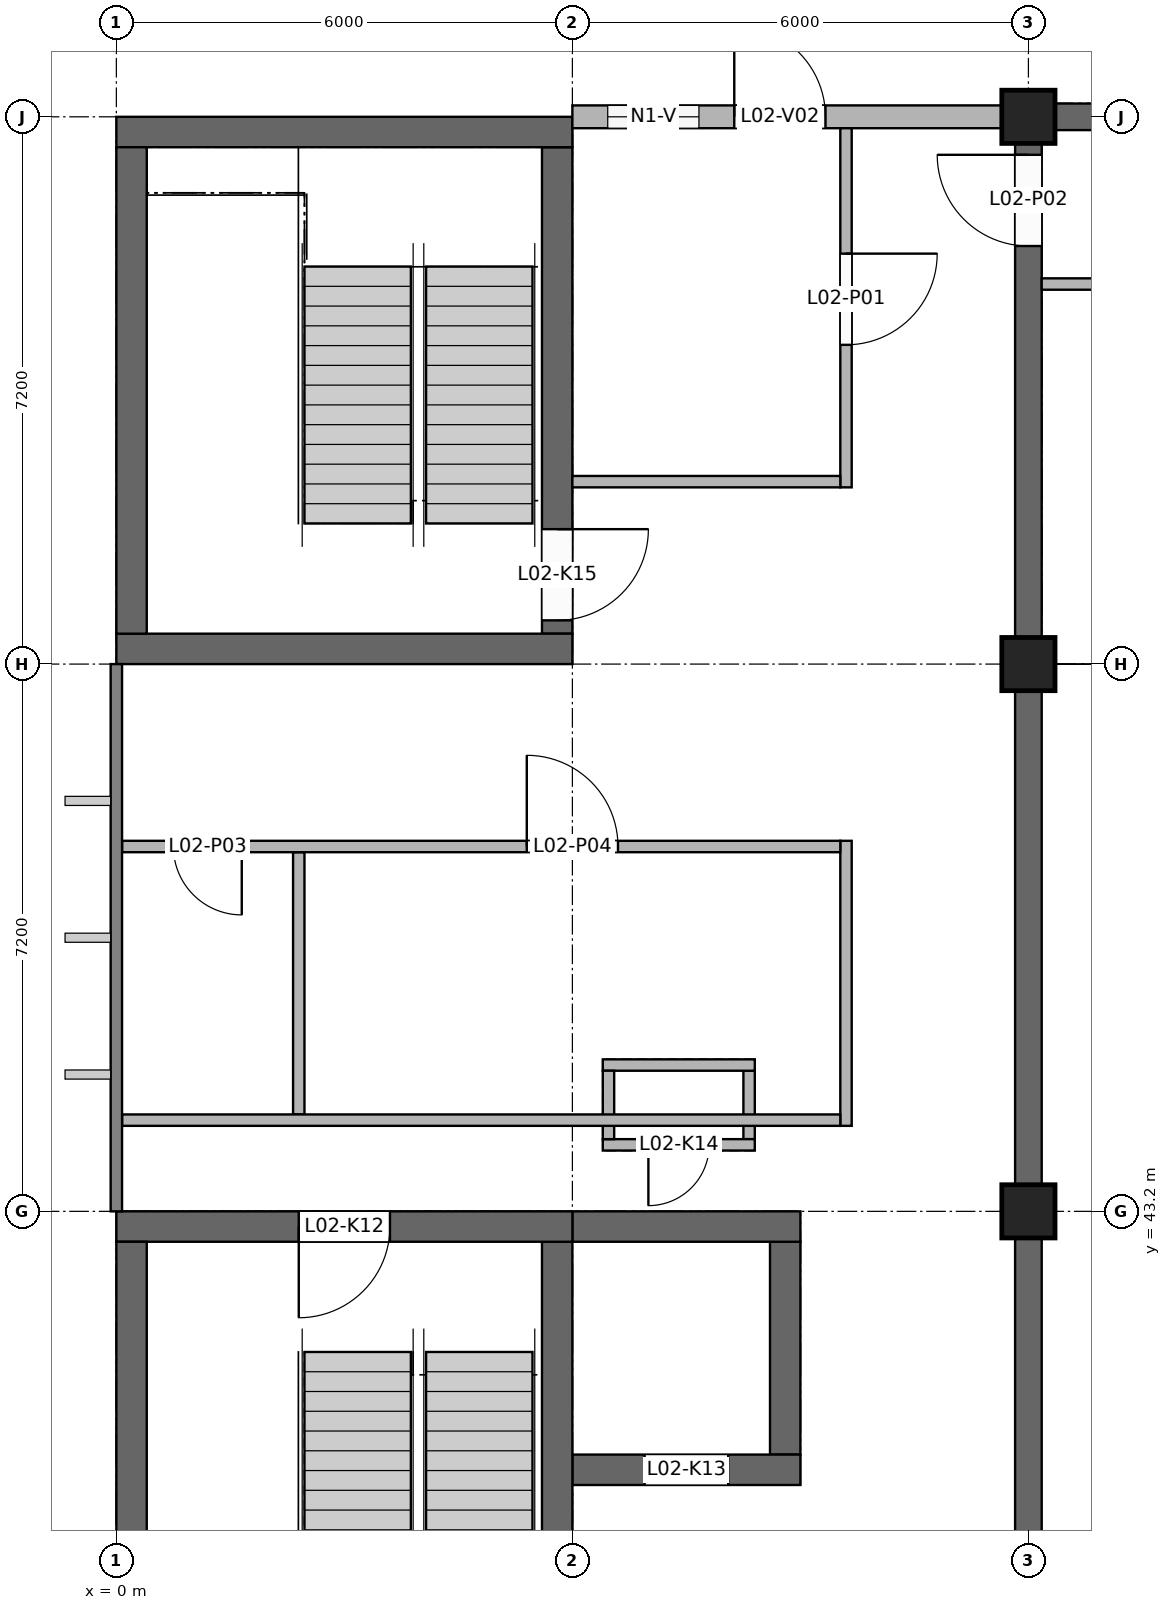
"""IFC4 building model, lengths in metres.
Left out: names, types, materials, properties, quantities, classifications, styles, units other than length and angle.
Written with IfcOpenShell. Run it as: python <this file> out.ifc"""

import sys

from ifc_helpers import new_model, si_unit, direction, frame, frame_2d, origin, origin_2d, place, context, subcontext, project, spatial, rectangle, extrude, element, fill, save


model = new_model("IFC4")
c1 = context("Model", 3, precision=1e-05, world=origin(), true_north=direction((0.0, 1.0)))
c2 = subcontext(c1, "Body", "Model", "MODEL_VIEW")
j1 = project(units=[si_unit("LENGTHUNIT", "METRE"), si_unit("PLANEANGLEUNIT", "RADIAN")], contexts=[c1])
p1 = place(None, origin())
s1 = spatial("IfcSite", under=j1, at=p1, CompositionType="ELEMENT")
p2 = place(p1, origin())
s2 = spatial("IfcBuilding", under=s1, at=p2, CompositionType="ELEMENT")
p3 = place(p2, frame((0.0, 0.0, 8.4)))
s3 = spatial("IfcBuildingStorey", under=s2, at=p3, CompositionType="ELEMENT", Elevation=8.4)
p4 = place(p3, frame((0.0, 43.0, 0.0), z_axis=(0.0, 0.0, 1.0), x_axis=(1.0, 0.0, 0.0)))
e1 = element("IfcWall", 1, at=p4, inside=s3, PredefinedType="SHEAR", context=c2, shape_type="SweptSolid", body=[
    extrude(rectangle(XDim=6.0, YDim=0.4, at=frame_2d((3.0, 0.0))), origin(), (0.0, 0.0, 1.0), 4.0),
])
p5 = place(p4, frame((2.4, 0.0, 0.0)))
e2 = element("IfcOpeningElement", 2, at=p5, cuts=e1, PredefinedType="OPENING", context=c2, shape_type="SweptSolid", body=[
    extrude(rectangle(XDim=1.2, YDim=2.1, at=frame_2d((0.6, 1.05))), frame((0.0, 0.21, 0.0), z_axis=(0.0, -1.0, 0.0), x_axis=(1.0, 0.0, 0.0)), (0.0, 0.0, 1.0), 0.42),
])
for number, where, z_axis, x_axis in (
    (3, (0.2, 36.4, 0.0), (0.0, 0.0, 1.0), (0.0, 1.0, 0.0)),
    (4, (5.8, 36.4, 0.0), (0.0, 0.0, 1.0), (0.0, 1.0, 0.0)),
):
    element("IfcWall", number, at=place(p3, frame(where, z_axis=z_axis, x_axis=x_axis)), inside=s3, PredefinedType="SHEAR", context=c2, shape_type="SweptSolid", body=[
        extrude(rectangle(XDim=6.4, YDim=0.4, at=frame_2d((3.2, 0.0))), origin(), (0.0, 0.0, 1.0), 4.0),
    ])
p6 = place(p3, frame((6.0, 39.8, 0.0), z_axis=(0.0, 0.0, 1.0), x_axis=(1.0, 0.0, 0.0)))
e5 = element("IfcWall", 5, at=p6, inside=s3, PredefinedType="SHEAR", context=c2, shape_type="SweptSolid", body=[
    extrude(rectangle(XDim=3.0, YDim=0.4, at=frame_2d((1.5, 0.0))), origin(), (0.0, 0.0, 1.0), 4.2),
])
p7 = place(p6, frame((0.95, 0.0, 0.0)))
e6 = element("IfcOpeningElement", 6, at=p7, cuts=e5, PredefinedType="OPENING", context=c2, shape_type="SweptSolid", body=[
    extrude(rectangle(XDim=1.1, YDim=2.1, at=frame_2d((0.55, 1.05))), frame((0.0, 0.21, 0.0), z_axis=(0.0, -1.0, 0.0), x_axis=(1.0, 0.0, 0.0)), (0.0, 0.0, 1.0), 0.42),
])
p8 = place(p3, frame((6.0, 43.0, 0.0), z_axis=(0.0, 0.0, 1.0), x_axis=(1.0, 0.0, 0.0)))
e7 = element("IfcWall", 7, at=p8, inside=s3, PredefinedType="SHEAR", context=c2, shape_type="SweptSolid", body=[
    extrude(rectangle(XDim=3.0, YDim=0.4, at=frame_2d((1.5, 0.0))), origin(), (0.0, 0.0, 1.0), 4.2),
])
p9 = place(p3, frame((8.8, 40.0, 0.0), z_axis=(0.0, 0.0, 1.0), x_axis=(0.0, 1.0, 0.0)))
e8 = element("IfcWall", 8, at=p9, inside=s3, PredefinedType="SHEAR", context=c2, shape_type="SweptSolid", body=[
    extrude(rectangle(XDim=2.8, YDim=0.4, at=frame_2d((1.4, 0.0))), origin(), (0.0, 0.0, 1.0), 4.2),
])
for number, where, z_axis, x_axis in (
    (9, (0.0, 50.6, 0.0), (0.0, 0.0, 1.0), (1.0, 0.0, 0.0)),
    (10, (0.0, 57.4, 0.0), (0.0, 0.0, 1.0), (1.0, 0.0, 0.0)),
):
    element("IfcWall", number, at=place(p3, frame(where, z_axis=z_axis, x_axis=x_axis)), inside=s3, PredefinedType="SHEAR", context=c2, shape_type="SweptSolid", body=[
        extrude(rectangle(XDim=6.0, YDim=0.4, at=frame_2d((3.0, 0.0))), origin(), (0.0, 0.0, 1.0), 4.0),
    ])
p10 = place(p3, frame((0.2, 50.8, 0.0), z_axis=(0.0, 0.0, 1.0), x_axis=(0.0, 1.0, 0.0)))
e11 = element("IfcWall", 11, at=p10, inside=s3, PredefinedType="SHEAR", context=c2, shape_type="SweptSolid", body=[
    extrude(rectangle(XDim=6.4, YDim=0.4, at=frame_2d((3.2, 0.0))), origin(), (0.0, 0.0, 1.0), 4.0),
])
p11 = place(p3, frame((5.8, 50.8, 0.0), z_axis=(0.0, 0.0, 1.0), x_axis=(0.0, 1.0, 0.0)))
e12 = element("IfcWall", 12, at=p11, inside=s3, PredefinedType="SHEAR", context=c2, shape_type="SweptSolid", body=[
    extrude(rectangle(XDim=6.4, YDim=0.4, at=frame_2d((3.2, 0.0))), origin(), (0.0, 0.0, 1.0), 4.0),
])
p12 = place(p11, frame((0.175, 0.0, 0.0)))
e13 = element("IfcOpeningElement", 13, at=p12, cuts=e12, PredefinedType="OPENING", context=c2, shape_type="SweptSolid", body=[
    extrude(rectangle(XDim=1.2, YDim=2.1, at=frame_2d((0.6, 1.05))), frame((0.0, 0.21, 0.0), z_axis=(0.0, -1.0, 0.0), x_axis=(1.0, 0.0, 0.0)), (0.0, 0.0, 1.0), 0.42),
])
p13 = place(p3, frame((6.4, 44.075, 0.0), z_axis=(0.0, 0.0, 1.0), x_axis=(1.0, 0.0, 0.0)))
e14 = element("IfcWall", 14, at=p13, inside=s3, PredefinedType="SOLIDWALL", context=c2, shape_type="SweptSolid", body=[
    extrude(rectangle(XDim=2.0, YDim=0.15, at=frame_2d((1.0, 0.0))), origin(), (0.0, 0.0, 1.0), 4.2),
])
p14 = place(p13, frame((0.6, 0.0, 0.0)))
e15 = element("IfcOpeningElement", 15, at=p14, cuts=e14, PredefinedType="OPENING", context=c2, shape_type="SweptSolid", body=[
    extrude(rectangle(XDim=0.8, YDim=2.1, at=frame_2d((0.4, 1.05))), frame((0.0, 0.085, 0.0), z_axis=(0.0, -1.0, 0.0), x_axis=(1.0, 0.0, 0.0)), (0.0, 0.0, 1.0), 0.17),
])
p15 = place(p3, frame((6.4, 45.125, 0.0), z_axis=(0.0, 0.0, 1.0), x_axis=(1.0, 0.0, 0.0)))
e16 = element("IfcWall", 16, at=p15, inside=s3, PredefinedType="SOLIDWALL", context=c2, shape_type="SweptSolid", body=[
    extrude(rectangle(XDim=2.0, YDim=0.15, at=frame_2d((1.0, 0.0))), origin(), (0.0, 0.0, 1.0), 4.2),
])
for number, where, z_axis, x_axis in (
    (17, (6.475, 44.15, 0.0), (0.0, 0.0, 1.0), (0.0, 1.0, 0.0)),
    (18, (8.325, 44.15, 0.0), (0.0, 0.0, 1.0), (0.0, 1.0, 0.0)),
):
    element("IfcWall", number, at=place(p3, frame(where, z_axis=z_axis, x_axis=x_axis)), inside=s3, PredefinedType="SOLIDWALL", context=c2, shape_type="SweptSolid", body=[
        extrude(rectangle(XDim=0.9, YDim=0.15, at=frame_2d((0.45, 0.0))), origin(), (0.0, 0.0, 1.0), 4.2),
    ])
for number, where, z_axis, x_axis in (
    (19, (12.0, 43.2, 0.0), (0.0, 0.0, 1.0), (1.0, 0.0, 0.0)),
    (20, (12.0, 50.4, 0.0), (0.0, 0.0, 1.0), (1.0, 0.0, 0.0)),
    (21, (12.0, 57.6, 0.0), (0.0, 0.0, 1.0), (1.0, 0.0, 0.0)),
):
    element("IfcColumn", number, at=place(p3, frame(where, z_axis=z_axis, x_axis=x_axis)), inside=s3, PredefinedType="COLUMN", context=c2, shape_type="SweptSolid", body=[
        extrude(rectangle(XDim=0.7, YDim=0.7, at=origin_2d()), origin(), (0.0, 0.0, 1.0), 4.0),
    ])
for number, where, z_axis, x_axis in (
    (22, (12.0, 36.35, 0.0), (0.0, 0.0, 1.0), (0.0, 1.0, 0.0)),
    (23, (12.0, 43.55, 0.0), (0.0, 0.0, 1.0), (0.0, 1.0, 0.0)),
):
    element("IfcWall", number, at=place(p3, frame(where, z_axis=z_axis, x_axis=x_axis)), inside=s3, PredefinedType="SHEAR", context=c2, shape_type="SweptSolid", body=[
        extrude(rectangle(XDim=6.5, YDim=0.35, at=frame_2d((3.25, 0.0))), origin(), (0.0, 0.0, 1.0), 3.1),
    ])
p16 = place(p3, frame((12.0, 50.75, 0.0), z_axis=(0.0, 0.0, 1.0), x_axis=(0.0, 1.0, 0.0)))
e24 = element("IfcWall", 24, at=p16, inside=s3, PredefinedType="SHEAR", context=c2, shape_type="SweptSolid", body=[
    extrude(rectangle(XDim=6.5, YDim=0.35, at=frame_2d((3.25, 0.0))), origin(), (0.0, 0.0, 1.0), 3.1),
])
p17 = place(p16, frame((5.15, 0.0, 0.0)))
e25 = element("IfcOpeningElement", 25, at=p17, cuts=e24, PredefinedType="OPENING", context=c2, shape_type="SweptSolid", body=[
    extrude(rectangle(XDim=1.2, YDim=2.1, at=frame_2d((0.6, 1.05))), frame((0.0, 0.185, 0.0), z_axis=(0.0, -1.0, 0.0), x_axis=(1.0, 0.0, 0.0)), (0.0, 0.0, 1.0), 0.37),
])
p18 = place(p3, frame((12.35, 57.6, 0.0), z_axis=(0.0, 0.0, 1.0), x_axis=(1.0, 0.0, 0.0)))
e26 = element("IfcWall", 26, at=p18, inside=s3, PredefinedType="SHEAR", context=c2, shape_type="SweptSolid", body=[
    extrude(rectangle(XDim=17.475, YDim=0.35, at=frame_2d((8.737, 0.0))), origin(), (0.0, 0.0, 1.0), 4.2),
])
p19 = place(p18, frame((0.85, 0.0, 1.2)))
e27 = element("IfcOpeningElement", 27, at=p19, cuts=e26, PredefinedType="OPENING", context=c2, shape_type="SweptSolid", body=[
    extrude(rectangle(XDim=0.6, YDim=2.4, at=frame_2d((0.3, 1.2))), frame((0.0, 0.185, 0.0), z_axis=(0.0, -1.0, 0.0), x_axis=(1.0, 0.0, 0.0)), (0.0, 0.0, 1.0), 0.37),
])
p20 = place(p18, frame((3.85, 0.0, 1.2)))
e28 = element("IfcOpeningElement", 28, at=p20, cuts=e26, PredefinedType="OPENING", context=c2, shape_type="SweptSolid", body=[
    extrude(rectangle(XDim=0.6, YDim=2.4, at=frame_2d((0.3, 1.2))), frame((0.0, 0.185, 0.0), z_axis=(0.0, -1.0, 0.0), x_axis=(1.0, 0.0, 0.0)), (0.0, 0.0, 1.0), 0.37),
])
p21 = place(p18, frame((6.85, 0.0, 1.2)))
e29 = element("IfcOpeningElement", 29, at=p21, cuts=e26, PredefinedType="OPENING", context=c2, shape_type="SweptSolid", body=[
    extrude(rectangle(XDim=0.6, YDim=2.4, at=frame_2d((0.3, 1.2))), frame((0.0, 0.185, 0.0), z_axis=(0.0, -1.0, 0.0), x_axis=(1.0, 0.0, 0.0)), (0.0, 0.0, 1.0), 0.37),
])
p22 = place(p18, frame((9.85, 0.0, 1.2)))
e30 = element("IfcOpeningElement", 30, at=p22, cuts=e26, PredefinedType="OPENING", context=c2, shape_type="SweptSolid", body=[
    extrude(rectangle(XDim=0.6, YDim=2.4, at=frame_2d((0.3, 1.2))), frame((0.0, 0.185, 0.0), z_axis=(0.0, -1.0, 0.0), x_axis=(1.0, 0.0, 0.0)), (0.0, 0.0, 1.0), 0.37),
])
p23 = place(p18, frame((12.85, 0.0, 1.2)))
e31 = element("IfcOpeningElement", 31, at=p23, cuts=e26, PredefinedType="OPENING", context=c2, shape_type="SweptSolid", body=[
    extrude(rectangle(XDim=0.6, YDim=2.4, at=frame_2d((0.3, 1.2))), frame((0.0, 0.185, 0.0), z_axis=(0.0, -1.0, 0.0), x_axis=(1.0, 0.0, 0.0)), (0.0, 0.0, 1.0), 0.37),
])
p24 = place(p18, frame((15.85, 0.0, 1.2)))
e32 = element("IfcOpeningElement", 32, at=p24, cuts=e26, PredefinedType="OPENING", context=c2, shape_type="SweptSolid", body=[
    extrude(rectangle(XDim=0.6, YDim=2.4, at=frame_2d((0.3, 1.2))), frame((0.0, 0.185, 0.0), z_axis=(0.0, -1.0, 0.0), x_axis=(1.0, 0.0, 0.0)), (0.0, 0.0, 1.0), 0.37),
])
p25 = place(p3, frame((6.0, 57.6, 0.0), z_axis=(0.0, 0.0, 1.0), x_axis=(1.0, 0.0, 0.0)))
e33 = element("IfcWall", 33, at=p25, inside=s3, PredefinedType="SOLIDWALL", context=c2, shape_type="SweptSolid", body=[
    extrude(rectangle(XDim=5.65, YDim=0.3, at=frame_2d((2.825, 0.0))), origin(), (0.0, 0.0, 1.0), 3.2),
])
p26 = place(p25, frame((2.13, 0.0, 0.0)))
e34 = element("IfcOpeningElement", 34, at=p26, cuts=e33, PredefinedType="OPENING", context=c2, shape_type="SweptSolid", body=[
    extrude(rectangle(XDim=1.2, YDim=2.4, at=frame_2d((0.6, 1.2))), frame((0.0, 0.16, 0.0), z_axis=(0.0, -1.0, 0.0), x_axis=(1.0, 0.0, 0.0)), (0.0, 0.0, 1.0), 0.32),
])
p27 = place(p25, frame((0.465, 0.0, 0.9)))
e35 = element("IfcOpeningElement", 35, at=p27, cuts=e33, PredefinedType="OPENING", context=c2, shape_type="SweptSolid", body=[
    extrude(rectangle(XDim=1.2, YDim=1.5, at=frame_2d((0.6, 0.75))), frame((0.0, 0.16, 0.0), z_axis=(0.0, -1.0, 0.0), x_axis=(1.0, 0.0, 0.0)), (0.0, 0.0, 1.0), 0.32),
])
p28 = place(p3, frame((2.4, 44.475, 0.0), z_axis=(0.0, 0.0, 1.0), x_axis=(0.0, 1.0, 0.0)))
e36 = element("IfcWall", 36, at=p28, inside=s3, PredefinedType="PARTITIONING", context=c2, shape_type="SweptSolid", body=[
    extrude(rectangle(XDim=3.45, YDim=0.15, at=frame_2d((1.725, 0.0))), origin(), (0.0, 0.0, 1.0), 4.0),
])
p29 = place(p3, frame((9.6, 44.325, 0.0), z_axis=(0.0, 0.0, 1.0), x_axis=(0.0, 1.0, 0.0)))
e37 = element("IfcWall", 37, at=p29, inside=s3, PredefinedType="PARTITIONING", context=c2, shape_type="SweptSolid", body=[
    extrude(rectangle(XDim=3.75, YDim=0.15, at=frame_2d((1.875, 0.0))), origin(), (0.0, 0.0, 1.0), 4.0),
])
p30 = place(p3, frame((9.6, 52.725, 0.0), z_axis=(0.0, 0.0, 1.0), x_axis=(0.0, 1.0, 0.0)))
e38 = element("IfcWall", 38, at=p30, inside=s3, PredefinedType="PARTITIONING", context=c2, shape_type="SweptSolid", body=[
    extrude(rectangle(XDim=4.725, YDim=0.15, at=frame_2d((2.362, 0.0))), origin(), (0.0, 0.0, 1.0), 3.2),
])
p31 = place(p30, frame((1.875, 0.0, 0.0)))
e39 = element("IfcOpeningElement", 39, at=p31, cuts=e38, PredefinedType="OPENING", context=c2, shape_type="SweptSolid", body=[
    extrude(rectangle(XDim=1.2, YDim=2.1, at=frame_2d((0.6, 1.05))), frame((0.0, 0.085, 0.0), z_axis=(0.0, -1.0, 0.0), x_axis=(1.0, 0.0, 0.0)), (0.0, 0.0, 1.0), 0.17),
])
p32 = place(p3, frame((0.075, 44.4, 0.0), z_axis=(0.0, 0.0, 1.0), x_axis=(1.0, 0.0, 0.0)))
e40 = element("IfcWall", 40, at=p32, inside=s3, PredefinedType="PARTITIONING", context=c2, shape_type="SweptSolid", body=[
    extrude(rectangle(XDim=9.45, YDim=0.15, at=frame_2d((4.725, 0.0))), origin(), (0.0, 0.0, 1.0), 4.0),
])
p33 = place(p3, frame((0.075, 48.0, 0.0), z_axis=(0.0, 0.0, 1.0), x_axis=(1.0, 0.0, 0.0)))
e41 = element("IfcWall", 41, at=p33, inside=s3, PredefinedType="PARTITIONING", context=c2, shape_type="SweptSolid", body=[
    extrude(rectangle(XDim=9.45, YDim=0.15, at=frame_2d((4.725, 0.0))), origin(), (0.0, 0.0, 1.0), 4.0),
])
p34 = place(p33, frame((0.675, 0.0, 0.0)))
e42 = element("IfcOpeningElement", 42, at=p34, cuts=e41, PredefinedType="OPENING", context=c2, shape_type="SweptSolid", body=[
    extrude(rectangle(XDim=0.9, YDim=2.1, at=frame_2d((0.45, 1.05))), frame((0.0, 0.085, 0.0), z_axis=(0.0, -1.0, 0.0), x_axis=(1.0, 0.0, 0.0)), (0.0, 0.0, 1.0), 0.17),
])
p35 = place(p33, frame((5.325, 0.0, 0.0)))
e43 = element("IfcOpeningElement", 43, at=p35, cuts=e41, PredefinedType="OPENING", context=c2, shape_type="SweptSolid", body=[
    extrude(rectangle(XDim=1.2, YDim=2.1, at=frame_2d((0.6, 1.05))), frame((0.0, 0.085, 0.0), z_axis=(0.0, -1.0, 0.0), x_axis=(1.0, 0.0, 0.0)), (0.0, 0.0, 1.0), 0.17),
])
p36 = place(p3, frame((6.0, 52.8, 0.0), z_axis=(0.0, 0.0, 1.0), x_axis=(1.0, 0.0, 0.0)))
e44 = element("IfcWall", 44, at=p36, inside=s3, PredefinedType="PARTITIONING", context=c2, shape_type="SweptSolid", body=[
    extrude(rectangle(XDim=3.525, YDim=0.15, at=frame_2d((1.762, 0.0))), origin(), (0.0, 0.0, 1.0), 4.0),
])
p37 = place(p3, frame((12.175, 55.4, 0.0), z_axis=(0.0, 0.0, 1.0), x_axis=(1.0, 0.0, 0.0)))
e45 = element("IfcWall", 45, at=p37, inside=s3, PredefinedType="PARTITIONING", context=c2, shape_type="SweptSolid", body=[
    extrude(rectangle(XDim=17.65, YDim=0.15, at=frame_2d((8.825, 0.0))), origin(), (0.0, 0.0, 1.0), 3.1),
])
p38 = place(p37, frame((4.325, 0.0, 0.0)))
e46 = element("IfcOpeningElement", 46, at=p38, cuts=e45, PredefinedType="OPENING", context=c2, shape_type="SweptSolid", body=[
    extrude(rectangle(XDim=1.8, YDim=2.1, at=frame_2d((0.9, 1.05))), frame((0.0, 0.085, 0.0), z_axis=(0.0, -1.0, 0.0), x_axis=(1.0, 0.0, 0.0)), (0.0, 0.0, 1.0), 0.17),
])
p39 = place(p37, frame((11.975, 0.0, 0.0)))
e47 = element("IfcOpeningElement", 47, at=p39, cuts=e45, PredefinedType="OPENING", context=c2, shape_type="SweptSolid", body=[
    extrude(rectangle(XDim=0.9, YDim=2.1, at=frame_2d((0.45, 1.05))), frame((0.0, 0.085, 0.0), z_axis=(0.0, -1.0, 0.0), x_axis=(1.0, 0.0, 0.0)), (0.0, 0.0, 1.0), 0.17),
])
p40 = place(p37, frame((15.575, 0.0, 0.0)))
e48 = element("IfcOpeningElement", 48, at=p40, cuts=e45, PredefinedType="OPENING", context=c2, shape_type="SweptSolid", body=[
    extrude(rectangle(XDim=0.9, YDim=2.1, at=frame_2d((0.45, 1.05))), frame((0.0, 0.085, 0.0), z_axis=(0.0, -1.0, 0.0), x_axis=(1.0, 0.0, 0.0)), (0.0, 0.0, 1.0), 0.17),
])
p41 = place(p26, origin())
e49 = element("IfcDoor", 49, at=p41, inside=s3, OperationType="SINGLE_SWING_LEFT", PredefinedType="DOOR", context=c2, shape_type="SweptSolid", body=[
    extrude(rectangle(XDim=1.2, YDim=2.4, at=frame_2d((0.6, 1.2))), frame((0.0, 0.025, 0.0), z_axis=(0.0, -1.0, 0.0), x_axis=(1.0, 0.0, 0.0)), (0.0, 0.0, 1.0), 0.05),
])
fill(e34, e49)
p42 = place(p27, origin())
e50 = element("IfcWindow", 50, at=p42, inside=s3, PartitioningType="SINGLE_PANEL", PredefinedType="WINDOW", context=c2, shape_type="SweptSolid", body=[
    extrude(rectangle(XDim=1.2, YDim=1.5, at=frame_2d((0.6, 0.75))), frame((0.0, 0.03, 0.0), z_axis=(0.0, -1.0, 0.0), x_axis=(1.0, 0.0, 0.0)), (0.0, 0.0, 1.0), 0.06),
])
fill(e35, e50)
p43 = place(p5, frame((1.2, 0.0, 0.0), z_axis=(0.0, 0.0, 1.0), x_axis=(-1.0, 0.0, 0.0)))
e51 = element("IfcDoor", 51, at=p43, inside=s3, OperationType="SINGLE_SWING_RIGHT", PredefinedType="DOOR", context=c2, shape_type="SweptSolid", body=[
    extrude(rectangle(XDim=1.2, YDim=2.1, at=frame_2d((0.6, 1.05))), frame((0.0, 0.025, 0.0), z_axis=(0.0, -1.0, 0.0), x_axis=(1.0, 0.0, 0.0)), (0.0, 0.0, 1.0), 0.05),
])
fill(e2, e51)
p44 = place(p7, origin())
e52 = element("IfcDoor", 52, at=p44, inside=s3, OperationType="DOUBLE_DOOR_SLIDING", PredefinedType="DOOR", context=c2, shape_type="SweptSolid", body=[
    extrude(rectangle(XDim=1.1, YDim=2.1, at=frame_2d((0.55, 1.05))), frame((0.0, 0.025, 0.0), z_axis=(0.0, -1.0, 0.0), x_axis=(1.0, 0.0, 0.0)), (0.0, 0.0, 1.0), 0.05),
])
fill(e6, e52)
p45 = place(p14, frame((0.8, 0.0, 0.0), z_axis=(0.0, 0.0, 1.0), x_axis=(-1.0, 0.0, 0.0)))
e53 = element("IfcDoor", 53, at=p45, inside=s3, OperationType="SINGLE_SWING_RIGHT", PredefinedType="DOOR", context=c2, shape_type="SweptSolid", body=[
    extrude(rectangle(XDim=0.8, YDim=2.1, at=frame_2d((0.4, 1.05))), frame((0.0, 0.025, 0.0), z_axis=(0.0, -1.0, 0.0), x_axis=(1.0, 0.0, 0.0)), (0.0, 0.0, 1.0), 0.05),
])
fill(e15, e53)
p46 = place(p12, frame((1.2, 0.0, 0.0), z_axis=(0.0, 0.0, 1.0), x_axis=(-1.0, 0.0, 0.0)))
e54 = element("IfcDoor", 54, at=p46, inside=s3, OperationType="SINGLE_SWING_LEFT", PredefinedType="DOOR", context=c2, shape_type="SweptSolid", body=[
    extrude(rectangle(XDim=1.2, YDim=2.1, at=frame_2d((0.6, 1.05))), frame((0.0, 0.025, 0.0), z_axis=(0.0, -1.0, 0.0), x_axis=(1.0, 0.0, 0.0)), (0.0, 0.0, 1.0), 0.05),
])
fill(e13, e54)
p47 = place(p31, frame((1.2, 0.0, 0.0), z_axis=(0.0, 0.0, 1.0), x_axis=(-1.0, 0.0, 0.0)))
e55 = element("IfcDoor", 55, at=p47, inside=s3, OperationType="SINGLE_SWING_LEFT", PredefinedType="DOOR", context=c2, shape_type="SweptSolid", body=[
    extrude(rectangle(XDim=1.2, YDim=2.1, at=frame_2d((0.6, 1.05))), frame((0.0, 0.025, 0.0), z_axis=(0.0, -1.0, 0.0), x_axis=(1.0, 0.0, 0.0)), (0.0, 0.0, 1.0), 0.05),
])
fill(e39, e55)
p48 = place(p17, origin())
e56 = element("IfcDoor", 56, at=p48, inside=s3, OperationType="SINGLE_SWING_RIGHT", PredefinedType="DOOR", context=c2, shape_type="SweptSolid", body=[
    extrude(rectangle(XDim=1.2, YDim=2.1, at=frame_2d((0.6, 1.05))), frame((0.0, 0.025, 0.0), z_axis=(0.0, -1.0, 0.0), x_axis=(1.0, 0.0, 0.0)), (0.0, 0.0, 1.0), 0.05),
])
fill(e25, e56)
p49 = place(p34, frame((0.9, 0.0, 0.0), z_axis=(0.0, 0.0, 1.0), x_axis=(-1.0, 0.0, 0.0)))
e57 = element("IfcDoor", 57, at=p49, inside=s3, OperationType="SINGLE_SWING_LEFT", PredefinedType="DOOR", context=c2, shape_type="SweptSolid", body=[
    extrude(rectangle(XDim=0.9, YDim=2.1, at=frame_2d((0.45, 1.05))), frame((0.0, 0.025, 0.0), z_axis=(0.0, -1.0, 0.0), x_axis=(1.0, 0.0, 0.0)), (0.0, 0.0, 1.0), 0.05),
])
fill(e42, e57)
p50 = place(p35, origin())
e58 = element("IfcDoor", 58, at=p50, inside=s3, OperationType="SINGLE_SWING_LEFT", PredefinedType="DOOR", context=c2, shape_type="SweptSolid", body=[
    extrude(rectangle(XDim=1.2, YDim=2.1, at=frame_2d((0.6, 1.05))), frame((0.0, 0.025, 0.0), z_axis=(0.0, -1.0, 0.0), x_axis=(1.0, 0.0, 0.0)), (0.0, 0.0, 1.0), 0.05),
])
fill(e43, e58)
save(model, sys.argv[1])
